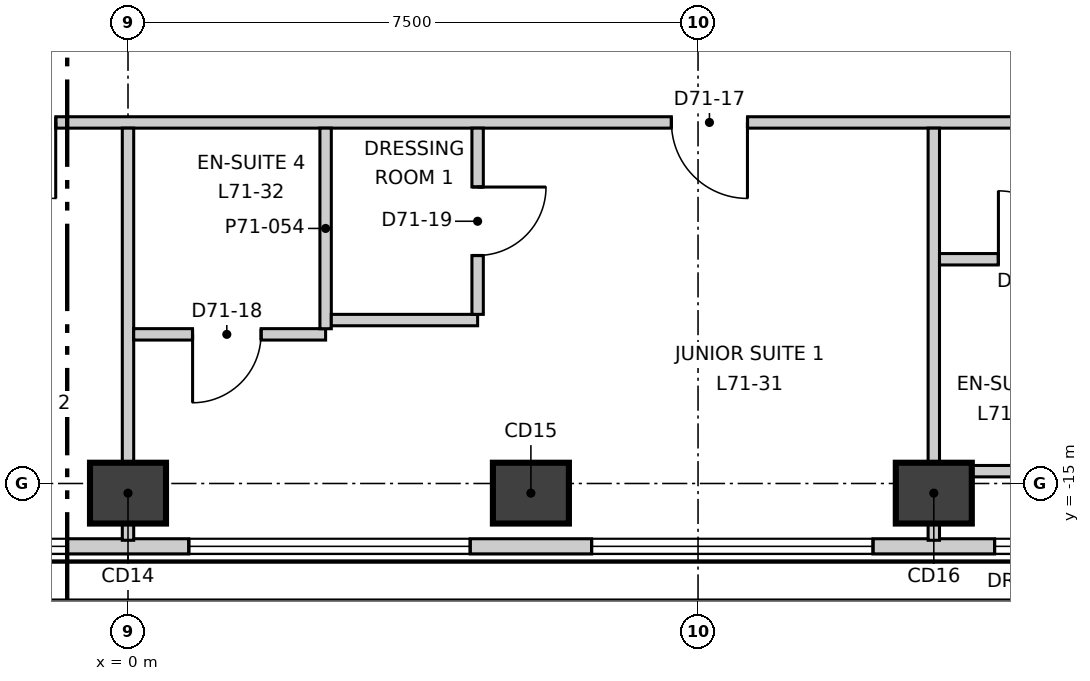
"""IFC4 building model, lengths in metres.
Left out: names, types, materials, properties, quantities, classifications, styles, units other than length and angle.
Written with IfcOpenShell. Run it as: python <this file> out.ifc"""

import sys

from ifc_helpers import new_model, si_unit, direction, frame, frame_2d, origin, origin_2d, place, context, subcontext, project, spatial, rectangle, extrude, element, fill, save


model = new_model("IFC4")
c1 = context("Model", 3, precision=1e-05, world=origin(), true_north=direction((0.0, 1.0)))
c2 = subcontext(c1, "Body", "Model", "MODEL_VIEW")
j1 = project(units=[si_unit("LENGTHUNIT", "METRE"), si_unit("PLANEANGLEUNIT", "RADIAN")], contexts=[c1])
p1 = place(None, origin())
s1 = spatial("IfcSite", under=j1, at=p1, CompositionType="ELEMENT")
p2 = place(p1, origin())
s2 = spatial("IfcBuilding", under=s1, at=p2, CompositionType="ELEMENT")
p3 = place(p2, frame((0.0, 0.0, 300.7)))
s3 = spatial("IfcBuildingStorey", under=s2, at=p3, CompositionType="ELEMENT", Elevation=300.7)
for number, where, z_axis, x_axis in (
    (1, (0.0, -15.127, -0.3), (0.0, 0.0, 1.0), (1.0, 0.0, 0.0)),
    (2, (5.301, -15.127, -0.3), (0.0, 0.0, 1.0), (1.0, 0.0, 0.0)),
    (3, (10.602, -15.127, -0.3), (0.0, 0.0, 1.0), (1.0, 0.0, 0.0)),
):
    element("IfcColumn", number, at=place(p3, frame(where, z_axis=z_axis, x_axis=x_axis)), inside=s3, PredefinedType="COLUMN", context=c2, shape_type="SweptSolid", body=[
        extrude(rectangle(XDim=1.0, YDim=0.8, at=origin_2d()), origin(), (0.0, 0.0, 1.0), 3.6),
    ])
p4 = place(p3, frame((-22.507, -15.827, 0.0), z_axis=(0.0, 0.0, 1.0), x_axis=(1.0, 0.0, 0.0)))
e4 = element("IfcWall", 4, at=p4, inside=s3, PredefinedType="ELEMENTEDWALL", context=c2, shape_type="SweptSolid", body=[
    extrude(rectangle(XDim=44.994, YDim=0.2, at=frame_2d((22.497, 0.0))), origin(), (0.0, 0.0, 1.0), 3.3),
])
p5 = place(p4, frame((2.104, 0.0, 0.9)))
e5 = element("IfcOpeningElement", 5, at=p5, cuts=e4, PredefinedType="OPENING", context=c2, shape_type="SweptSolid", body=[
    extrude(rectangle(XDim=3.7, YDim=2.2, at=frame_2d((1.85, 1.1))), frame((0.0, 0.11, 0.0), z_axis=(0.0, -1.0, 0.0), x_axis=(1.0, 0.0, 0.0)), (0.0, 0.0, 1.0), 0.22),
])
p6 = place(p4, frame((7.405, 0.0, 0.9)))
e6 = element("IfcOpeningElement", 6, at=p6, cuts=e4, PredefinedType="OPENING", context=c2, shape_type="SweptSolid", body=[
    extrude(rectangle(XDim=3.7, YDim=2.2, at=frame_2d((1.85, 1.1))), frame((0.0, 0.11, 0.0), z_axis=(0.0, -1.0, 0.0), x_axis=(1.0, 0.0, 0.0)), (0.0, 0.0, 1.0), 0.22),
])
p7 = place(p4, frame((12.706, 0.0, 0.9)))
e7 = element("IfcOpeningElement", 7, at=p7, cuts=e4, PredefinedType="OPENING", context=c2, shape_type="SweptSolid", body=[
    extrude(rectangle(XDim=3.7, YDim=2.2, at=frame_2d((1.85, 1.1))), frame((0.0, 0.11, 0.0), z_axis=(0.0, -1.0, 0.0), x_axis=(1.0, 0.0, 0.0)), (0.0, 0.0, 1.0), 0.22),
])
p8 = place(p4, frame((18.006, 0.0, 0.9)))
e8 = element("IfcOpeningElement", 8, at=p8, cuts=e4, PredefinedType="OPENING", context=c2, shape_type="SweptSolid", body=[
    extrude(rectangle(XDim=3.7, YDim=2.2, at=frame_2d((1.85, 1.1))), frame((0.0, 0.11, 0.0), z_axis=(0.0, -1.0, 0.0), x_axis=(1.0, 0.0, 0.0)), (0.0, 0.0, 1.0), 0.22),
])
p9 = place(p4, frame((23.308, 0.0, 0.9)))
e9 = element("IfcOpeningElement", 9, at=p9, cuts=e4, PredefinedType="OPENING", context=c2, shape_type="SweptSolid", body=[
    extrude(rectangle(XDim=3.7, YDim=2.2, at=frame_2d((1.85, 1.1))), frame((0.0, 0.11, 0.0), z_axis=(0.0, -1.0, 0.0), x_axis=(1.0, 0.0, 0.0)), (0.0, 0.0, 1.0), 0.22),
])
p10 = place(p4, frame((28.608, 0.0, 0.9)))
e10 = element("IfcOpeningElement", 10, at=p10, cuts=e4, PredefinedType="OPENING", context=c2, shape_type="SweptSolid", body=[
    extrude(rectangle(XDim=3.7, YDim=2.2, at=frame_2d((1.85, 1.1))), frame((0.0, 0.11, 0.0), z_axis=(0.0, -1.0, 0.0), x_axis=(1.0, 0.0, 0.0)), (0.0, 0.0, 1.0), 0.22),
])
p11 = place(p4, frame((33.91, 0.0, 0.9)))
e11 = element("IfcOpeningElement", 11, at=p11, cuts=e4, PredefinedType="OPENING", context=c2, shape_type="SweptSolid", body=[
    extrude(rectangle(XDim=3.7, YDim=2.2, at=frame_2d((1.85, 1.1))), frame((0.0, 0.11, 0.0), z_axis=(0.0, -1.0, 0.0), x_axis=(1.0, 0.0, 0.0)), (0.0, 0.0, 1.0), 0.22),
])
p12 = place(p4, frame((39.21, 0.0, 0.9)))
e12 = element("IfcOpeningElement", 12, at=p12, cuts=e4, PredefinedType="OPENING", context=c2, shape_type="SweptSolid", body=[
    extrude(rectangle(XDim=3.7, YDim=2.2, at=frame_2d((1.85, 1.1))), frame((0.0, 0.11, 0.0), z_axis=(0.0, -1.0, 0.0), x_axis=(1.0, 0.0, 0.0)), (0.0, 0.0, 1.0), 0.22),
])
p13 = place(p3, frame((24.96, -11.578, 0.0), z_axis=(0.0, 0.0, 1.0), x_axis=(-0.500002391419, 0.866024023094, 0.0)))
e13 = element("IfcWall", 13, at=p13, inside=s3, PredefinedType="ELEMENTEDWALL", context=c2, shape_type="SweptSolid", body=[
    extrude(rectangle(XDim=44.994, YDim=0.2, at=frame_2d((22.497, 0.0))), origin(), (0.0, 0.0, 1.0), 3.3),
])
p14 = place(p13, frame((2.103, 0.0, 0.9)))
e14 = element("IfcOpeningElement", 14, at=p14, cuts=e13, PredefinedType="OPENING", context=c2, shape_type="SweptSolid", body=[
    extrude(rectangle(XDim=3.7, YDim=2.2, at=frame_2d((1.85, 1.1))), frame((0.0, 0.11, 0.0), z_axis=(0.0, -1.0, 0.0), x_axis=(1.0, 0.0, 0.0)), (0.0, 0.0, 1.0), 0.22),
])
p15 = place(p13, frame((7.404, 0.0, 0.9)))
e15 = element("IfcOpeningElement", 15, at=p15, cuts=e13, PredefinedType="OPENING", context=c2, shape_type="SweptSolid", body=[
    extrude(rectangle(XDim=3.7, YDim=2.2, at=frame_2d((1.85, 1.1))), frame((0.0, 0.11, 0.0), z_axis=(0.0, -1.0, 0.0), x_axis=(1.0, 0.0, 0.0)), (0.0, 0.0, 1.0), 0.22),
])
p16 = place(p13, frame((12.705, 0.0, 0.9)))
e16 = element("IfcOpeningElement", 16, at=p16, cuts=e13, PredefinedType="OPENING", context=c2, shape_type="SweptSolid", body=[
    extrude(rectangle(XDim=3.7, YDim=2.2, at=frame_2d((1.85, 1.1))), frame((0.0, 0.11, 0.0), z_axis=(0.0, -1.0, 0.0), x_axis=(1.0, 0.0, 0.0)), (0.0, 0.0, 1.0), 0.22),
])
p17 = place(p13, frame((18.006, 0.0, 0.9)))
e17 = element("IfcOpeningElement", 17, at=p17, cuts=e13, PredefinedType="OPENING", context=c2, shape_type="SweptSolid", body=[
    extrude(rectangle(XDim=3.7, YDim=2.2, at=frame_2d((1.85, 1.1))), frame((0.0, 0.11, 0.0), z_axis=(0.0, -1.0, 0.0), x_axis=(1.0, 0.0, 0.0)), (0.0, 0.0, 1.0), 0.22),
])
p18 = place(p13, frame((23.308, 0.0, 0.9)))
e18 = element("IfcOpeningElement", 18, at=p18, cuts=e13, PredefinedType="OPENING", context=c2, shape_type="SweptSolid", body=[
    extrude(rectangle(XDim=3.7, YDim=2.2, at=frame_2d((1.85, 1.1))), frame((0.0, 0.11, 0.0), z_axis=(0.0, -1.0, 0.0), x_axis=(1.0, 0.0, 0.0)), (0.0, 0.0, 1.0), 0.22),
])
p19 = place(p13, frame((28.609, 0.0, 0.9)))
e19 = element("IfcOpeningElement", 19, at=p19, cuts=e13, PredefinedType="OPENING", context=c2, shape_type="SweptSolid", body=[
    extrude(rectangle(XDim=3.7, YDim=2.2, at=frame_2d((1.85, 1.1))), frame((0.0, 0.11, 0.0), z_axis=(0.0, -1.0, 0.0), x_axis=(1.0, 0.0, 0.0)), (0.0, 0.0, 1.0), 0.22),
])
p20 = place(p13, frame((33.91, 0.0, 0.9)))
e20 = element("IfcOpeningElement", 20, at=p20, cuts=e13, PredefinedType="OPENING", context=c2, shape_type="SweptSolid", body=[
    extrude(rectangle(XDim=3.7, YDim=2.2, at=frame_2d((1.85, 1.1))), frame((0.0, 0.11, 0.0), z_axis=(0.0, -1.0, 0.0), x_axis=(1.0, 0.0, 0.0)), (0.0, 0.0, 1.0), 0.22),
])
p21 = place(p13, frame((39.211, 0.0, 0.9)))
e21 = element("IfcOpeningElement", 21, at=p21, cuts=e13, PredefinedType="OPENING", context=c2, shape_type="SweptSolid", body=[
    extrude(rectangle(XDim=3.7, YDim=2.2, at=frame_2d((1.85, 1.1))), frame((0.0, 0.11, 0.0), z_axis=(0.0, -1.0, 0.0), x_axis=(1.0, 0.0, 0.0)), (0.0, 0.0, 1.0), 0.22),
])
p22 = place(p3, frame((-17.603, -10.25, 0.0), z_axis=(0.0, 0.0, 1.0), x_axis=(1.0, 0.0, 0.0)))
e22 = element("IfcWall", 22, at=p22, inside=s3, PredefinedType="PARTITIONING", context=c2, shape_type="SweptSolid", body=[
    extrude(rectangle(XDim=35.356, YDim=0.15, at=frame_2d((17.678, 0.0))), origin(), (0.0, 0.0, 1.0), 3.3),
])
p23 = place(p22, frame((2.9, 0.0, 0.0)))
e23 = element("IfcOpeningElement", 23, at=p23, cuts=e22, PredefinedType="OPENING", context=c2, shape_type="SweptSolid", body=[
    extrude(rectangle(XDim=1.0, YDim=2.1, at=frame_2d((0.5, 1.05))), frame((0.0, 0.085, 0.0), z_axis=(0.0, -1.0, 0.0), x_axis=(1.0, 0.0, 0.0)), (0.0, 0.0, 1.0), 0.17),
])
p24 = place(p22, frame((10.351, 0.0, 0.0)))
e24 = element("IfcOpeningElement", 24, at=p24, cuts=e22, PredefinedType="OPENING", context=c2, shape_type="SweptSolid", body=[
    extrude(rectangle(XDim=1.0, YDim=2.1, at=frame_2d((0.5, 1.05))), frame((0.0, 0.085, 0.0), z_axis=(0.0, -1.0, 0.0), x_axis=(1.0, 0.0, 0.0)), (0.0, 0.0, 1.0), 0.17),
])
p25 = place(p22, frame((15.652, 0.0, 0.0)))
e25 = element("IfcOpeningElement", 25, at=p25, cuts=e22, PredefinedType="OPENING", context=c2, shape_type="SweptSolid", body=[
    extrude(rectangle(XDim=1.0, YDim=2.1, at=frame_2d((0.5, 1.05))), frame((0.0, 0.085, 0.0), z_axis=(0.0, -1.0, 0.0), x_axis=(1.0, 0.0, 0.0)), (0.0, 0.0, 1.0), 0.17),
])
p26 = place(p22, frame((24.753, 0.0, 0.0)))
e26 = element("IfcOpeningElement", 26, at=p26, cuts=e22, PredefinedType="OPENING", context=c2, shape_type="SweptSolid", body=[
    extrude(rectangle(XDim=1.0, YDim=2.1, at=frame_2d((0.5, 1.05))), frame((0.0, 0.085, 0.0), z_axis=(0.0, -1.0, 0.0), x_axis=(1.0, 0.0, 0.0)), (0.0, 0.0, 1.0), 0.17),
])
p27 = place(p22, frame((31.255, 0.0, 0.0)))
e27 = element("IfcOpeningElement", 27, at=p27, cuts=e22, PredefinedType="OPENING", context=c2, shape_type="SweptSolid", body=[
    extrude(rectangle(XDim=1.0, YDim=2.1, at=frame_2d((0.5, 1.05))), frame((0.0, 0.085, 0.0), z_axis=(0.0, -1.0, 0.0), x_axis=(1.0, 0.0, 0.0)), (0.0, 0.0, 1.0), 0.17),
])
p28 = place(p3, frame((-17.679, -10.12, 0.0), z_axis=(0.0, 0.0, 1.0), x_axis=(0.500008955215, 0.866020233427, 0.0)))
e28 = element("IfcWall", 28, at=p28, inside=s3, PredefinedType="PARTITIONING", context=c2, shape_type="SweptSolid", body=[
    extrude(rectangle(XDim=35.357, YDim=0.15, at=frame_2d((17.679, 0.0))), origin(), (0.0, 0.0, 1.0), 3.3),
])
p29 = place(p28, frame((31.307, 0.0, 0.0)))
e29 = element("IfcOpeningElement", 29, at=p29, cuts=e28, PredefinedType="OPENING", context=c2, shape_type="SweptSolid", body=[
    extrude(rectangle(XDim=1.0, YDim=2.1, at=frame_2d((0.5, 1.05))), frame((0.0, 0.085, 0.0), z_axis=(0.0, -1.0, 0.0), x_axis=(1.0, 0.0, 0.0)), (0.0, 0.0, 1.0), 0.17),
])
p30 = place(p28, frame((20.056, 0.0, 0.0)))
e30 = element("IfcOpeningElement", 30, at=p30, cuts=e28, PredefinedType="OPENING", context=c2, shape_type="SweptSolid", body=[
    extrude(rectangle(XDim=1.0, YDim=2.1, at=frame_2d((0.5, 1.05))), frame((0.0, 0.085, 0.0), z_axis=(0.0, -1.0, 0.0), x_axis=(1.0, 0.0, 0.0)), (0.0, 0.0, 1.0), 0.17),
])
p31 = place(p28, frame((13.253, 0.0, 0.0)))
e31 = element("IfcOpeningElement", 31, at=p31, cuts=e28, PredefinedType="OPENING", context=c2, shape_type="SweptSolid", body=[
    extrude(rectangle(XDim=1.0, YDim=2.1, at=frame_2d((0.5, 1.05))), frame((0.0, 0.085, 0.0), z_axis=(0.0, -1.0, 0.0), x_axis=(1.0, 0.0, 0.0)), (0.0, 0.0, 1.0), 0.17),
])
p32 = place(p28, frame((7.653, 0.0, 0.0)))
e32 = element("IfcOpeningElement", 32, at=p32, cuts=e28, PredefinedType="OPENING", context=c2, shape_type="SweptSolid", body=[
    extrude(rectangle(XDim=1.0, YDim=2.1, at=frame_2d((0.5, 1.05))), frame((0.0, 0.085, 0.0), z_axis=(0.0, -1.0, 0.0), x_axis=(1.0, 0.0, 0.0)), (0.0, 0.0, 1.0), 0.17),
])
p33 = place(p28, frame((2.952, 0.0, 0.0)))
e33 = element("IfcOpeningElement", 33, at=p33, cuts=e28, PredefinedType="OPENING", context=c2, shape_type="SweptSolid", body=[
    extrude(rectangle(XDim=1.0, YDim=2.1, at=frame_2d((0.5, 1.05))), frame((0.0, 0.085, 0.0), z_axis=(0.0, -1.0, 0.0), x_axis=(1.0, 0.0, 0.0)), (0.0, 0.0, 1.0), 0.17),
])
p34 = place(p3, frame((0.0, -15.747, 0.0), z_axis=(0.0, 0.0, 1.0), x_axis=(0.0, 1.0, 0.0)))
e34 = element("IfcWall", 34, at=p34, inside=s3, PredefinedType="PARTITIONING", context=c2, shape_type="SweptSolid", body=[
    extrude(rectangle(XDim=5.422, YDim=0.15, at=frame_2d((2.711, 0.0))), origin(), (0.0, 0.0, 1.0), 2.8),
])
p35 = place(p3, frame((0.075, 20.37, 0.0), z_axis=(0.0, 0.0, 1.0), x_axis=(0.500009775255, -0.866019759965, 0.0)))
e35 = element("IfcWall", 35, at=p35, inside=s3, PredefinedType="PARTITIONING", context=c2, shape_type="SweptSolid", body=[
    extrude(rectangle(XDim=35.207, YDim=0.15, at=frame_2d((17.604, 0.0))), origin(), (0.0, 0.0, 1.0), 3.3),
])
p36 = place(p35, frame((31.307, 0.0, 0.0)))
e36 = element("IfcOpeningElement", 36, at=p36, cuts=e35, PredefinedType="OPENING", context=c2, shape_type="SweptSolid", body=[
    extrude(rectangle(XDim=1.0, YDim=2.1, at=frame_2d((0.5, 1.05))), frame((0.0, 0.085, 0.0), z_axis=(0.0, -1.0, 0.0), x_axis=(1.0, 0.0, 0.0)), (0.0, 0.0, 1.0), 0.17),
])
p37 = place(p35, frame((20.355, 0.0, 0.0)))
e37 = element("IfcOpeningElement", 37, at=p37, cuts=e35, PredefinedType="OPENING", context=c2, shape_type="SweptSolid", body=[
    extrude(rectangle(XDim=1.0, YDim=2.1, at=frame_2d((0.5, 1.05))), frame((0.0, 0.085, 0.0), z_axis=(0.0, -1.0, 0.0), x_axis=(1.0, 0.0, 0.0)), (0.0, 0.0, 1.0), 0.17),
])
p38 = place(p35, frame((24.355, 0.0, 0.0)))
e38 = element("IfcOpeningElement", 38, at=p38, cuts=e35, PredefinedType="OPENING", context=c2, shape_type="SweptSolid", body=[
    extrude(rectangle(XDim=0.9, YDim=2.1, at=frame_2d((0.45, 1.05))), frame((0.0, 0.085, 0.0), z_axis=(0.0, -1.0, 0.0), x_axis=(1.0, 0.0, 0.0)), (0.0, 0.0, 1.0), 0.17),
])
p39 = place(p35, frame((22.255, 0.0, 0.0)))
e39 = element("IfcOpeningElement", 39, at=p39, cuts=e35, PredefinedType="OPENING", context=c2, shape_type="SweptSolid", body=[
    extrude(rectangle(XDim=0.9, YDim=2.1, at=frame_2d((0.45, 1.05))), frame((0.0, 0.085, 0.0), z_axis=(0.0, -1.0, 0.0), x_axis=(1.0, 0.0, 0.0)), (0.0, 0.0, 1.0), 0.17),
])
p40 = place(p35, frame((8.453, 0.0, 0.0)))
e40 = element("IfcOpeningElement", 40, at=p40, cuts=e35, PredefinedType="OPENING", context=c2, shape_type="SweptSolid", body=[
    extrude(rectangle(XDim=1.0, YDim=2.1, at=frame_2d((0.5, 1.05))), frame((0.0, 0.085, 0.0), z_axis=(0.0, -1.0, 0.0), x_axis=(1.0, 0.0, 0.0)), (0.0, 0.0, 1.0), 0.17),
])
p41 = place(p35, frame((13.753, 0.0, 0.0)))
e41 = element("IfcOpeningElement", 41, at=p41, cuts=e35, PredefinedType="OPENING", context=c2, shape_type="SweptSolid", body=[
    extrude(rectangle(XDim=0.9, YDim=2.1, at=frame_2d((0.45, 1.05))), frame((0.0, 0.085, 0.0), z_axis=(0.0, -1.0, 0.0), x_axis=(1.0, 0.0, 0.0)), (0.0, 0.0, 1.0), 0.17),
])
p42 = place(p35, frame((11.553, 0.0, 0.0)))
e42 = element("IfcOpeningElement", 42, at=p42, cuts=e35, PredefinedType="OPENING", context=c2, shape_type="SweptSolid", body=[
    extrude(rectangle(XDim=0.9, YDim=2.1, at=frame_2d((0.45, 1.05))), frame((0.0, 0.085, 0.0), z_axis=(0.0, -1.0, 0.0), x_axis=(1.0, 0.0, 0.0)), (0.0, 0.0, 1.0), 0.17),
])
p43 = place(p35, frame((2.951, 0.0, 0.0)))
e43 = element("IfcOpeningElement", 43, at=p43, cuts=e35, PredefinedType="OPENING", context=c2, shape_type="SweptSolid", body=[
    extrude(rectangle(XDim=1.0, YDim=2.1, at=frame_2d((0.5, 1.05))), frame((0.0, 0.085, 0.0), z_axis=(0.0, -1.0, 0.0), x_axis=(1.0, 0.0, 0.0)), (0.0, 0.0, 1.0), 0.17),
])
p44 = place(p3, frame((10.602, -15.747, 0.0), z_axis=(0.0, 0.0, 1.0), x_axis=(0.0, 1.0, 0.0)))
e44 = element("IfcWall", 44, at=p44, inside=s3, PredefinedType="PARTITIONING", context=c2, shape_type="SweptSolid", body=[
    extrude(rectangle(XDim=5.422, YDim=0.15, at=frame_2d((2.711, 0.0))), origin(), (0.0, 0.0, 1.0), 3.3),
])
p45 = place(p3, frame((10.677, -12.05, 0.0), z_axis=(0.0, 0.0, 1.0), x_axis=(1.0, 0.0, 0.0)))
e45 = element("IfcWall", 45, at=p45, inside=s3, PredefinedType="PARTITIONING", context=c2, shape_type="SweptSolid", body=[
    extrude(rectangle(XDim=4.525, YDim=0.15, at=frame_2d((2.262, 0.0))), origin(), (0.0, 0.0, 1.0), 3.3),
])
p46 = place(p45, frame((0.775, 0.0, 0.0)))
e46 = element("IfcOpeningElement", 46, at=p46, cuts=e45, PredefinedType="OPENING", context=c2, shape_type="SweptSolid", body=[
    extrude(rectangle(XDim=0.9, YDim=2.1, at=frame_2d((0.45, 1.05))), frame((0.0, 0.085, 0.0), z_axis=(0.0, -1.0, 0.0), x_axis=(1.0, 0.0, 0.0)), (0.0, 0.0, 1.0), 0.17),
])
p47 = place(p3, frame((10.677, -14.838, 0.0), z_axis=(0.0, 0.0, 1.0), x_axis=(1.0, 0.0, 0.0)))
e47 = element("IfcWall", 47, at=p47, inside=s3, PredefinedType="PARTITIONING", context=c2, shape_type="SweptSolid", body=[
    extrude(rectangle(XDim=2.525, YDim=0.15, at=frame_2d((1.262, 0.0))), origin(), (0.0, 0.0, 1.0), 2.6),
])
p48 = place(p3, frame((0.075, -13.038, 0.0), z_axis=(0.0, 0.0, 1.0), x_axis=(1.0, 0.0, 0.0)))
e48 = element("IfcWall", 48, at=p48, inside=s3, PredefinedType="PARTITIONING", context=c2, shape_type="SweptSolid", body=[
    extrude(rectangle(XDim=2.525, YDim=0.15, at=frame_2d((1.263, 0.0))), origin(), (0.0, 0.0, 1.0), 3.3),
])
p49 = place(p48, frame((0.775, 0.0, 0.0)))
e49 = element("IfcOpeningElement", 49, at=p49, cuts=e48, PredefinedType="OPENING", context=c2, shape_type="SweptSolid", body=[
    extrude(rectangle(XDim=0.9, YDim=2.1, at=frame_2d((0.45, 1.05))), frame((0.0, 0.085, 0.0), z_axis=(0.0, -1.0, 0.0), x_axis=(1.0, 0.0, 0.0)), (0.0, 0.0, 1.0), 0.17),
])
p50 = place(p3, frame((2.6, -12.964, 0.0), z_axis=(0.0, 0.0, 1.0), x_axis=(0.0, 1.0, 0.0)))
e50 = element("IfcWall", 50, at=p50, inside=s3, PredefinedType="PARTITIONING", context=c2, shape_type="SweptSolid", body=[
    extrude(rectangle(XDim=2.639, YDim=0.15, at=frame_2d((1.32, 0.0))), origin(), (0.0, 0.0, 1.0), 3.3),
])
p51 = place(p3, frame((2.675, -12.85, 0.0), z_axis=(0.0, 0.0, 1.0), x_axis=(1.0, 0.0, 0.0)))
e51 = element("IfcWall", 51, at=p51, inside=s3, PredefinedType="PARTITIONING", context=c2, shape_type="SweptSolid", body=[
    extrude(rectangle(XDim=1.925, YDim=0.15, at=frame_2d((0.962, 0.0))), origin(), (0.0, 0.0, 1.0), 3.3),
])
p52 = place(p3, frame((4.6, -12.775, 0.0), z_axis=(0.0, 0.0, 1.0), x_axis=(0.0, 1.0, 0.0)))
e52 = element("IfcWall", 52, at=p52, inside=s3, PredefinedType="PARTITIONING", context=c2, shape_type="SweptSolid", body=[
    extrude(rectangle(XDim=2.45, YDim=0.15, at=frame_2d((1.225, 0.0))), origin(), (0.0, 0.0, 1.0), 3.3),
])
p53 = place(p52, frame((0.775, 0.0, 0.0)))
e53 = element("IfcOpeningElement", 53, at=p53, cuts=e52, PredefinedType="OPENING", context=c2, shape_type="SweptSolid", body=[
    extrude(rectangle(XDim=0.9, YDim=2.1, at=frame_2d((0.45, 1.05))), frame((0.0, 0.085, 0.0), z_axis=(0.0, -1.0, 0.0), x_axis=(1.0, 0.0, 0.0)), (0.0, 0.0, 1.0), 0.17),
])
p54 = place(p8, origin())
e54 = element("IfcWindow", 54, at=p54, inside=s3, PartitioningType="SINGLE_PANEL", PredefinedType="WINDOW", context=c2, shape_type="SweptSolid", body=[
    extrude(rectangle(XDim=3.7, YDim=2.2, at=frame_2d((1.85, 1.1))), frame((0.0, 0.03, 0.0), z_axis=(0.0, -1.0, 0.0), x_axis=(1.0, 0.0, 0.0)), (0.0, 0.0, 1.0), 0.06),
])
fill(e8, e54)
p55 = place(p9, origin())
e55 = element("IfcWindow", 55, at=p55, inside=s3, PartitioningType="SINGLE_PANEL", PredefinedType="WINDOW", context=c2, shape_type="SweptSolid", body=[
    extrude(rectangle(XDim=3.7, YDim=2.2, at=frame_2d((1.85, 1.1))), frame((0.0, 0.03, 0.0), z_axis=(0.0, -1.0, 0.0), x_axis=(1.0, 0.0, 0.0)), (0.0, 0.0, 1.0), 0.06),
])
fill(e9, e55)
p56 = place(p10, origin())
e56 = element("IfcWindow", 56, at=p56, inside=s3, PartitioningType="SINGLE_PANEL", PredefinedType="WINDOW", context=c2, shape_type="SweptSolid", body=[
    extrude(rectangle(XDim=3.7, YDim=2.2, at=frame_2d((1.85, 1.1))), frame((0.0, 0.03, 0.0), z_axis=(0.0, -1.0, 0.0), x_axis=(1.0, 0.0, 0.0)), (0.0, 0.0, 1.0), 0.06),
])
fill(e10, e56)
p57 = place(p11, origin())
e57 = element("IfcWindow", 57, at=p57, inside=s3, PartitioningType="SINGLE_PANEL", PredefinedType="WINDOW", context=c2, shape_type="SweptSolid", body=[
    extrude(rectangle(XDim=3.7, YDim=2.2, at=frame_2d((1.85, 1.1))), frame((0.0, 0.03, 0.0), z_axis=(0.0, -1.0, 0.0), x_axis=(1.0, 0.0, 0.0)), (0.0, 0.0, 1.0), 0.06),
])
fill(e11, e57)
p58 = place(p25, origin())
e58 = element("IfcDoor", 58, at=p58, inside=s3, OperationType="SINGLE_SWING_RIGHT", PredefinedType="DOOR", context=c2, shape_type="SweptSolid", body=[
    extrude(rectangle(XDim=1.0, YDim=2.1, at=frame_2d((0.5, 1.05))), frame((0.0, 0.025, 0.0), z_axis=(0.0, -1.0, 0.0), x_axis=(1.0, 0.0, 0.0)), (0.0, 0.0, 1.0), 0.05),
])
fill(e25, e58)
p59 = place(p26, origin())
e59 = element("IfcDoor", 59, at=p59, inside=s3, OperationType="SINGLE_SWING_RIGHT", PredefinedType="DOOR", context=c2, shape_type="SweptSolid", body=[
    extrude(rectangle(XDim=1.0, YDim=2.1, at=frame_2d((0.5, 1.05))), frame((0.0, 0.025, 0.0), z_axis=(0.0, -1.0, 0.0), x_axis=(1.0, 0.0, 0.0)), (0.0, 0.0, 1.0), 0.05),
])
fill(e26, e59)
p60 = place(p49, origin())
e60 = element("IfcDoor", 60, at=p60, inside=s3, OperationType="SINGLE_SWING_LEFT", PredefinedType="DOOR", context=c2, shape_type="SweptSolid", body=[
    extrude(rectangle(XDim=0.9, YDim=2.1, at=frame_2d((0.45, 1.05))), frame((0.0, 0.025, 0.0), z_axis=(0.0, -1.0, 0.0), x_axis=(1.0, 0.0, 0.0)), (0.0, 0.0, 1.0), 0.05),
])
fill(e49, e60)
p61 = place(p53, origin())
e61 = element("IfcDoor", 61, at=p61, inside=s3, OperationType="SINGLE_SWING_RIGHT", PredefinedType="DOOR", context=c2, shape_type="SweptSolid", body=[
    extrude(rectangle(XDim=0.9, YDim=2.1, at=frame_2d((0.45, 1.05))), frame((0.0, 0.025, 0.0), z_axis=(0.0, -1.0, 0.0), x_axis=(1.0, 0.0, 0.0)), (0.0, 0.0, 1.0), 0.05),
])
fill(e53, e61)
p62 = place(p46, origin())
e62 = element("IfcDoor", 62, at=p62, inside=s3, OperationType="SINGLE_SWING_RIGHT", PredefinedType="DOOR", context=c2, shape_type="SweptSolid", body=[
    extrude(rectangle(XDim=0.9, YDim=2.1, at=frame_2d((0.45, 1.05))), frame((0.0, 0.025, 0.0), z_axis=(0.0, -1.0, 0.0), x_axis=(1.0, 0.0, 0.0)), (0.0, 0.0, 1.0), 0.05),
])
fill(e46, e62)
save(model, sys.argv[1])
